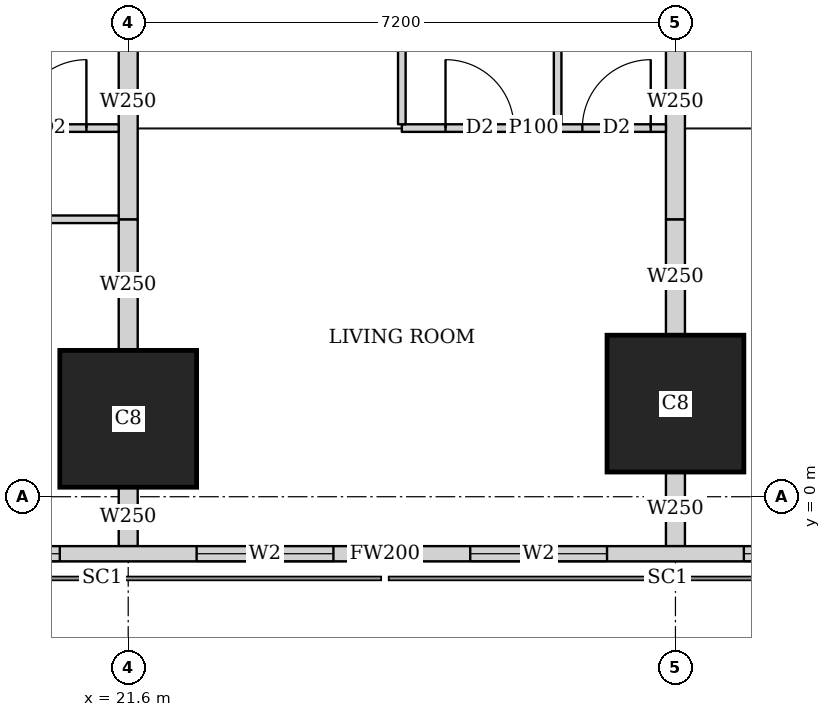
"""IFC4 building model, lengths in metres.
Left out: names, types, materials, properties, quantities, classifications, styles, units other than length and angle.
Written with IfcOpenShell. Run it as: python <this file> out.ifc"""

import sys

from ifc_helpers import new_model, si_unit, direction, frame, frame_2d, origin, origin_2d, place, context, subcontext, project, spatial, rectangle, extrude, element, fill, save


model = new_model("IFC4")
c1 = context("Model", 3, precision=1e-05, world=origin(), true_north=direction((0.0, 1.0)))
c2 = subcontext(c1, "Body", "Model", "MODEL_VIEW")
j1 = project(units=[si_unit("LENGTHUNIT", "METRE"), si_unit("PLANEANGLEUNIT", "RADIAN")], contexts=[c1])
p1 = place(None, origin())
s1 = spatial("IfcSite", under=j1, at=p1, CompositionType="ELEMENT")
p2 = place(p1, origin())
s2 = spatial("IfcBuilding", under=s1, at=p2, CompositionType="ELEMENT")
p3 = place(p2, frame((0.0, 0.0, 184.55)))
s3 = spatial("IfcBuildingStorey", under=s2, at=p3, CompositionType="ELEMENT", Elevation=184.55)
for number, where, z_axis, x_axis in (
    (1, (21.6, 1.025, 0.0), (0.0, 0.0, 1.0), (1.0, 0.0, 0.0)),
    (2, (28.8, 1.225, 0.0), (0.0, 0.0, 1.0), (1.0, 0.0, 0.0)),
):
    element("IfcColumn", number, at=place(p3, frame(where, z_axis=z_axis, x_axis=x_axis)), inside=s3, PredefinedType="COLUMN", context=c2, shape_type="SweptSolid", body=[
        extrude(rectangle(XDim=1.8, YDim=1.8, at=origin_2d()), origin(), (0.0, 0.0, 1.0), 3.75),
    ])
p4 = place(p3, frame((2.163, -0.75, 0.0), z_axis=(0.0, 0.0, 1.0), x_axis=(1.0, 0.0, 0.0)))
e3 = element("IfcWall", 3, at=p4, inside=s3, PredefinedType="SOLIDWALL", context=c2, shape_type="SweptSolid", body=[
    extrude(rectangle(XDim=45.628, YDim=0.2, at=frame_2d((22.814, 0.0))), origin(), (0.0, 0.0, 1.0), 3.45),
])
p5 = place(p4, frame((9.537, 0.0, 0.9)))
e4 = element("IfcOpeningElement", 4, at=p5, cuts=e3, PredefinedType="OPENING", context=c2, shape_type="SweptSolid", body=[
    extrude(rectangle(XDim=1.8, YDim=1.5, at=frame_2d((0.9, 0.75))), frame((0.0, 0.11, 0.0), z_axis=(0.0, -1.0, 0.0), x_axis=(1.0, 0.0, 0.0)), (0.0, 0.0, 1.0), 0.22),
])
p6 = place(p4, frame((13.137, 0.0, 0.9)))
e5 = element("IfcOpeningElement", 5, at=p6, cuts=e3, PredefinedType="OPENING", context=c2, shape_type="SweptSolid", body=[
    extrude(rectangle(XDim=1.8, YDim=1.5, at=frame_2d((0.9, 0.75))), frame((0.0, 0.11, 0.0), z_axis=(0.0, -1.0, 0.0), x_axis=(1.0, 0.0, 0.0)), (0.0, 0.0, 1.0), 0.22),
])
p7 = place(p4, frame((16.737, 0.0, 0.9)))
e6 = element("IfcOpeningElement", 6, at=p7, cuts=e3, PredefinedType="OPENING", context=c2, shape_type="SweptSolid", body=[
    extrude(rectangle(XDim=1.8, YDim=1.5, at=frame_2d((0.9, 0.75))), frame((0.0, 0.11, 0.0), z_axis=(0.0, -1.0, 0.0), x_axis=(1.0, 0.0, 0.0)), (0.0, 0.0, 1.0), 0.22),
])
p8 = place(p4, frame((20.337, 0.0, 0.9)))
e7 = element("IfcOpeningElement", 7, at=p8, cuts=e3, PredefinedType="OPENING", context=c2, shape_type="SweptSolid", body=[
    extrude(rectangle(XDim=1.8, YDim=1.5, at=frame_2d((0.9, 0.75))), frame((0.0, 0.11, 0.0), z_axis=(0.0, -1.0, 0.0), x_axis=(1.0, 0.0, 0.0)), (0.0, 0.0, 1.0), 0.22),
])
p9 = place(p4, frame((23.937, 0.0, 0.9)))
e8 = element("IfcOpeningElement", 8, at=p9, cuts=e3, PredefinedType="OPENING", context=c2, shape_type="SweptSolid", body=[
    extrude(rectangle(XDim=1.8, YDim=1.5, at=frame_2d((0.9, 0.75))), frame((0.0, 0.11, 0.0), z_axis=(0.0, -1.0, 0.0), x_axis=(1.0, 0.0, 0.0)), (0.0, 0.0, 1.0), 0.22),
])
p10 = place(p4, frame((27.537, 0.0, 0.9)))
e9 = element("IfcOpeningElement", 9, at=p10, cuts=e3, PredefinedType="OPENING", context=c2, shape_type="SweptSolid", body=[
    extrude(rectangle(XDim=1.8, YDim=1.5, at=frame_2d((0.9, 0.75))), frame((0.0, 0.11, 0.0), z_axis=(0.0, -1.0, 0.0), x_axis=(1.0, 0.0, 0.0)), (0.0, 0.0, 1.0), 0.22),
])
p11 = place(p4, frame((31.137, 0.0, 0.9)))
e10 = element("IfcOpeningElement", 10, at=p11, cuts=e3, PredefinedType="OPENING", context=c2, shape_type="SweptSolid", body=[
    extrude(rectangle(XDim=1.8, YDim=1.5, at=frame_2d((0.9, 0.75))), frame((0.0, 0.11, 0.0), z_axis=(0.0, -1.0, 0.0), x_axis=(1.0, 0.0, 0.0)), (0.0, 0.0, 1.0), 0.22),
])
p12 = place(p4, frame((34.737, 0.0, 0.9)))
e11 = element("IfcOpeningElement", 11, at=p12, cuts=e3, PredefinedType="OPENING", context=c2, shape_type="SweptSolid", body=[
    extrude(rectangle(XDim=1.8, YDim=1.5, at=frame_2d((0.9, 0.75))), frame((0.0, 0.11, 0.0), z_axis=(0.0, -1.0, 0.0), x_axis=(1.0, 0.0, 0.0)), (0.0, 0.0, 1.0), 0.22),
])
p13 = place(p3, frame((21.475, 3.65, 0.0), z_axis=(0.0, 0.0, 1.0), x_axis=(-1.0, 0.0, 0.0)))
e12 = element("IfcWall", 12, at=p13, inside=s3, PredefinedType="PARTITIONING", context=c2, shape_type="SweptSolid", body=[
    extrude(rectangle(XDim=7.075, YDim=0.1, at=frame_2d((3.538, 0.0))), origin(), (0.0, 0.0, 1.0), 3.45),
])
p14 = place(p13, frame((5.975, 0.0, 0.0)))
e13 = element("IfcOpeningElement", 13, at=p14, cuts=e12, PredefinedType="OPENING", context=c2, shape_type="SweptSolid", body=[
    extrude(rectangle(XDim=0.9, YDim=2.1, at=frame_2d((0.45, 1.05))), frame((0.0, 0.06, 0.0), z_axis=(0.0, -1.0, 0.0), x_axis=(1.0, 0.0, 0.0)), (0.0, 0.0, 1.0), 0.12),
])
p15 = place(p13, frame((2.375, 0.0, 0.0)))
e14 = element("IfcOpeningElement", 14, at=p15, cuts=e12, PredefinedType="OPENING", context=c2, shape_type="SweptSolid", body=[
    extrude(rectangle(XDim=0.9, YDim=2.1, at=frame_2d((0.45, 1.05))), frame((0.0, 0.06, 0.0), z_axis=(0.0, -1.0, 0.0), x_axis=(1.0, 0.0, 0.0)), (0.0, 0.0, 1.0), 0.12),
])
p16 = place(p3, frame((21.475, 4.85, 0.0), z_axis=(0.0, 0.0, 1.0), x_axis=(-1.0, 0.0, 0.0)))
e15 = element("IfcWall", 15, at=p16, inside=s3, PredefinedType="PARTITIONING", context=c2, shape_type="SweptSolid", body=[
    extrude(rectangle(XDim=7.075, YDim=0.1, at=frame_2d((3.538, 0.0))), origin(), (0.0, 0.0, 1.0), 3.45),
])
p17 = place(p16, frame((5.6, 0.0, 0.0)))
e16 = element("IfcOpeningElement", 16, at=p17, cuts=e15, PredefinedType="OPENING", context=c2, shape_type="SweptSolid", body=[
    extrude(rectangle(XDim=0.9, YDim=2.1, at=frame_2d((0.45, 1.05))), frame((0.0, 0.06, 0.0), z_axis=(0.0, -1.0, 0.0), x_axis=(1.0, 0.0, 0.0)), (0.0, 0.0, 1.0), 0.12),
])
p18 = place(p16, frame((2.225, 0.0, 0.0)))
e17 = element("IfcOpeningElement", 17, at=p18, cuts=e15, PredefinedType="OPENING", context=c2, shape_type="SweptSolid", body=[
    extrude(rectangle(XDim=0.9, YDim=2.1, at=frame_2d((0.45, 1.05))), frame((0.0, 0.06, 0.0), z_axis=(0.0, -1.0, 0.0), x_axis=(1.0, 0.0, 0.0)), (0.0, 0.0, 1.0), 0.12),
])
p19 = place(p16, frame((3.8, 0.0, 0.0)))
e18 = element("IfcOpeningElement", 18, at=p19, cuts=e15, PredefinedType="OPENING", context=c2, shape_type="SweptSolid", body=[
    extrude(rectangle(XDim=0.9, YDim=2.1, at=frame_2d((0.45, 1.05))), frame((0.0, 0.06, 0.0), z_axis=(0.0, -1.0, 0.0), x_axis=(1.0, 0.0, 0.0)), (0.0, 0.0, 1.0), 0.12),
])
p20 = place(p16, frame((0.425, 0.0, 0.0)))
e19 = element("IfcOpeningElement", 19, at=p20, cuts=e15, PredefinedType="OPENING", context=c2, shape_type="SweptSolid", body=[
    extrude(rectangle(XDim=0.9, YDim=2.1, at=frame_2d((0.45, 1.05))), frame((0.0, 0.06, 0.0), z_axis=(0.0, -1.0, 0.0), x_axis=(1.0, 0.0, 0.0)), (0.0, 0.0, 1.0), 0.12),
])
p21 = place(p3, frame((28.675, 4.85, 0.0), z_axis=(0.0, 0.0, 1.0), x_axis=(-1.0, 0.0, 0.0)))
e20 = element("IfcWall", 20, at=p21, inside=s3, PredefinedType="PARTITIONING", context=c2, shape_type="SweptSolid", body=[
    extrude(rectangle(XDim=3.475, YDim=0.1, at=frame_2d((1.738, 0.0))), origin(), (0.0, 0.0, 1.0), 3.45),
])
p22 = place(p21, frame((2.0, 0.0, 0.0)))
e21 = element("IfcOpeningElement", 21, at=p22, cuts=e20, PredefinedType="OPENING", context=c2, shape_type="SweptSolid", body=[
    extrude(rectangle(XDim=0.9, YDim=2.1, at=frame_2d((0.45, 1.05))), frame((0.0, 0.06, 0.0), z_axis=(0.0, -1.0, 0.0), x_axis=(1.0, 0.0, 0.0)), (0.0, 0.0, 1.0), 0.12),
])
p23 = place(p21, frame((0.2, 0.0, 0.0)))
e22 = element("IfcOpeningElement", 22, at=p23, cuts=e20, PredefinedType="OPENING", context=c2, shape_type="SweptSolid", body=[
    extrude(rectangle(XDim=0.9, YDim=2.1, at=frame_2d((0.45, 1.05))), frame((0.0, 0.06, 0.0), z_axis=(0.0, -1.0, 0.0), x_axis=(1.0, 0.0, 0.0)), (0.0, 0.0, 1.0), 0.12),
])
for number, where, z_axis, x_axis in (
    (23, (25.2, 4.9, 0.0), (0.0, 0.0, 1.0), (0.0, 1.0, 0.0)),
    (24, (27.25, 4.9, 0.0), (0.0, 0.0, 1.0), (0.0, 1.0, 0.0)),
):
    element("IfcWall", number, at=place(p3, frame(where, z_axis=z_axis, x_axis=x_axis)), inside=s3, PredefinedType="PARTITIONING", context=c2, shape_type="SweptSolid", body=[
        extrude(rectangle(XDim=3.525, YDim=0.1, at=frame_2d((1.763, 0.0))), origin(), (0.0, 0.0, 1.0), 3.45),
    ])
p24 = place(p3, frame((21.6, -0.65, 0.0), z_axis=(0.0, 0.0, 1.0), x_axis=(0.0, 1.0, 0.0)))
e25 = element("IfcWall", 25, at=p24, inside=s3, PredefinedType="SOLIDWALL", context=c2, shape_type="SweptSolid", body=[
    extrude(rectangle(XDim=0.774, YDim=0.25, at=frame_2d((0.387, 0.0))), origin(), (0.0, 0.0, 1.0), 2.05),
])
p25 = place(p3, frame((21.6, 1.926, 0.0), z_axis=(0.0, 0.0, 1.0), x_axis=(0.0, 1.0, 0.0)))
e26 = element("IfcWall", 26, at=p25, inside=s3, PredefinedType="SOLIDWALL", context=c2, shape_type="SweptSolid", body=[
    extrude(rectangle(XDim=1.724, YDim=0.25, at=frame_2d((0.862, 0.0))), origin(), (0.0, 0.0, 1.0), 2.05),
])
p26 = place(p3, frame((21.6, 3.65, 0.0), z_axis=(0.0, 0.0, 1.0), x_axis=(0.0, 1.0, 0.0)))
e27 = element("IfcWall", 27, at=p26, inside=s3, PredefinedType="SOLIDWALL", context=c2, shape_type="SweptSolid", body=[
    extrude(rectangle(XDim=3.099, YDim=0.25, at=frame_2d((1.55, 0.0))), origin(), (0.0, 0.0, 1.0), 3.45),
])
p27 = place(p3, frame((28.8, -0.65, 0.0), z_axis=(0.0, 0.0, 1.0), x_axis=(0.0, 1.0, 0.0)))
e28 = element("IfcWall", 28, at=p27, inside=s3, PredefinedType="SOLIDWALL", context=c2, shape_type="SweptSolid", body=[
    extrude(rectangle(XDim=0.974, YDim=0.25, at=frame_2d((0.487, 0.0))), origin(), (0.0, 0.0, 1.0), 2.05),
])
p28 = place(p3, frame((28.8, 2.126, 0.0), z_axis=(0.0, 0.0, 1.0), x_axis=(0.0, 1.0, 0.0)))
e29 = element("IfcWall", 29, at=p28, inside=s3, PredefinedType="SOLIDWALL", context=c2, shape_type="SweptSolid", body=[
    extrude(rectangle(XDim=1.524, YDim=0.25, at=frame_2d((0.762, 0.0))), origin(), (0.0, 0.0, 1.0), 2.05),
])
p29 = place(p3, frame((28.8, 3.65, 0.0), z_axis=(0.0, 0.0, 1.0), x_axis=(0.0, 1.0, 0.0)))
e30 = element("IfcWall", 30, at=p29, inside=s3, PredefinedType="SOLIDWALL", context=c2, shape_type="SweptSolid", body=[
    extrude(rectangle(XDim=3.099, YDim=0.25, at=frame_2d((1.55, 0.0))), origin(), (0.0, 0.0, 1.0), 3.45),
])
p30 = place(p7, origin())
e31 = element("IfcWindow", 31, at=p30, inside=s3, PartitioningType="SINGLE_PANEL", PredefinedType="WINDOW", context=c2, shape_type="SweptSolid", body=[
    extrude(rectangle(XDim=1.8, YDim=1.5, at=frame_2d((0.9, 0.75))), frame((0.0, 0.03, 0.0), z_axis=(0.0, -1.0, 0.0), x_axis=(1.0, 0.0, 0.0)), (0.0, 0.0, 1.0), 0.06),
])
fill(e6, e31)
p31 = place(p8, origin())
e32 = element("IfcWindow", 32, at=p31, inside=s3, PartitioningType="SINGLE_PANEL", PredefinedType="WINDOW", context=c2, shape_type="SweptSolid", body=[
    extrude(rectangle(XDim=1.8, YDim=1.5, at=frame_2d((0.9, 0.75))), frame((0.0, 0.03, 0.0), z_axis=(0.0, -1.0, 0.0), x_axis=(1.0, 0.0, 0.0)), (0.0, 0.0, 1.0), 0.06),
])
fill(e7, e32)
p32 = place(p9, origin())
e33 = element("IfcWindow", 33, at=p32, inside=s3, PartitioningType="SINGLE_PANEL", PredefinedType="WINDOW", context=c2, shape_type="SweptSolid", body=[
    extrude(rectangle(XDim=1.8, YDim=1.5, at=frame_2d((0.9, 0.75))), frame((0.0, 0.03, 0.0), z_axis=(0.0, -1.0, 0.0), x_axis=(1.0, 0.0, 0.0)), (0.0, 0.0, 1.0), 0.06),
])
fill(e8, e33)
p33 = place(p10, origin())
e34 = element("IfcWindow", 34, at=p33, inside=s3, PartitioningType="SINGLE_PANEL", PredefinedType="WINDOW", context=c2, shape_type="SweptSolid", body=[
    extrude(rectangle(XDim=1.8, YDim=1.5, at=frame_2d((0.9, 0.75))), frame((0.0, 0.03, 0.0), z_axis=(0.0, -1.0, 0.0), x_axis=(1.0, 0.0, 0.0)), (0.0, 0.0, 1.0), 0.06),
])
fill(e9, e34)
p34 = place(p20, origin())
e35 = element("IfcDoor", 35, at=p34, inside=s3, OperationType="SINGLE_SWING_RIGHT", PredefinedType="DOOR", context=c2, shape_type="SweptSolid", body=[
    extrude(rectangle(XDim=0.9, YDim=2.1, at=frame_2d((0.45, 1.05))), frame((0.0, 0.025, 0.0), z_axis=(0.0, -1.0, 0.0), x_axis=(1.0, 0.0, 0.0)), (0.0, 0.0, 1.0), 0.05),
])
fill(e19, e35)
p35 = place(p22, origin())
e36 = element("IfcDoor", 36, at=p35, inside=s3, OperationType="SINGLE_SWING_LEFT", PredefinedType="DOOR", context=c2, shape_type="SweptSolid", body=[
    extrude(rectangle(XDim=0.9, YDim=2.1, at=frame_2d((0.45, 1.05))), frame((0.0, 0.025, 0.0), z_axis=(0.0, -1.0, 0.0), x_axis=(1.0, 0.0, 0.0)), (0.0, 0.0, 1.0), 0.05),
])
fill(e21, e36)
p36 = place(p23, origin())
e37 = element("IfcDoor", 37, at=p36, inside=s3, OperationType="SINGLE_SWING_RIGHT", PredefinedType="DOOR", context=c2, shape_type="SweptSolid", body=[
    extrude(rectangle(XDim=0.9, YDim=2.1, at=frame_2d((0.45, 1.05))), frame((0.0, 0.025, 0.0), z_axis=(0.0, -1.0, 0.0), x_axis=(1.0, 0.0, 0.0)), (0.0, 0.0, 1.0), 0.05),
])
fill(e22, e37)
save(model, sys.argv[1])
